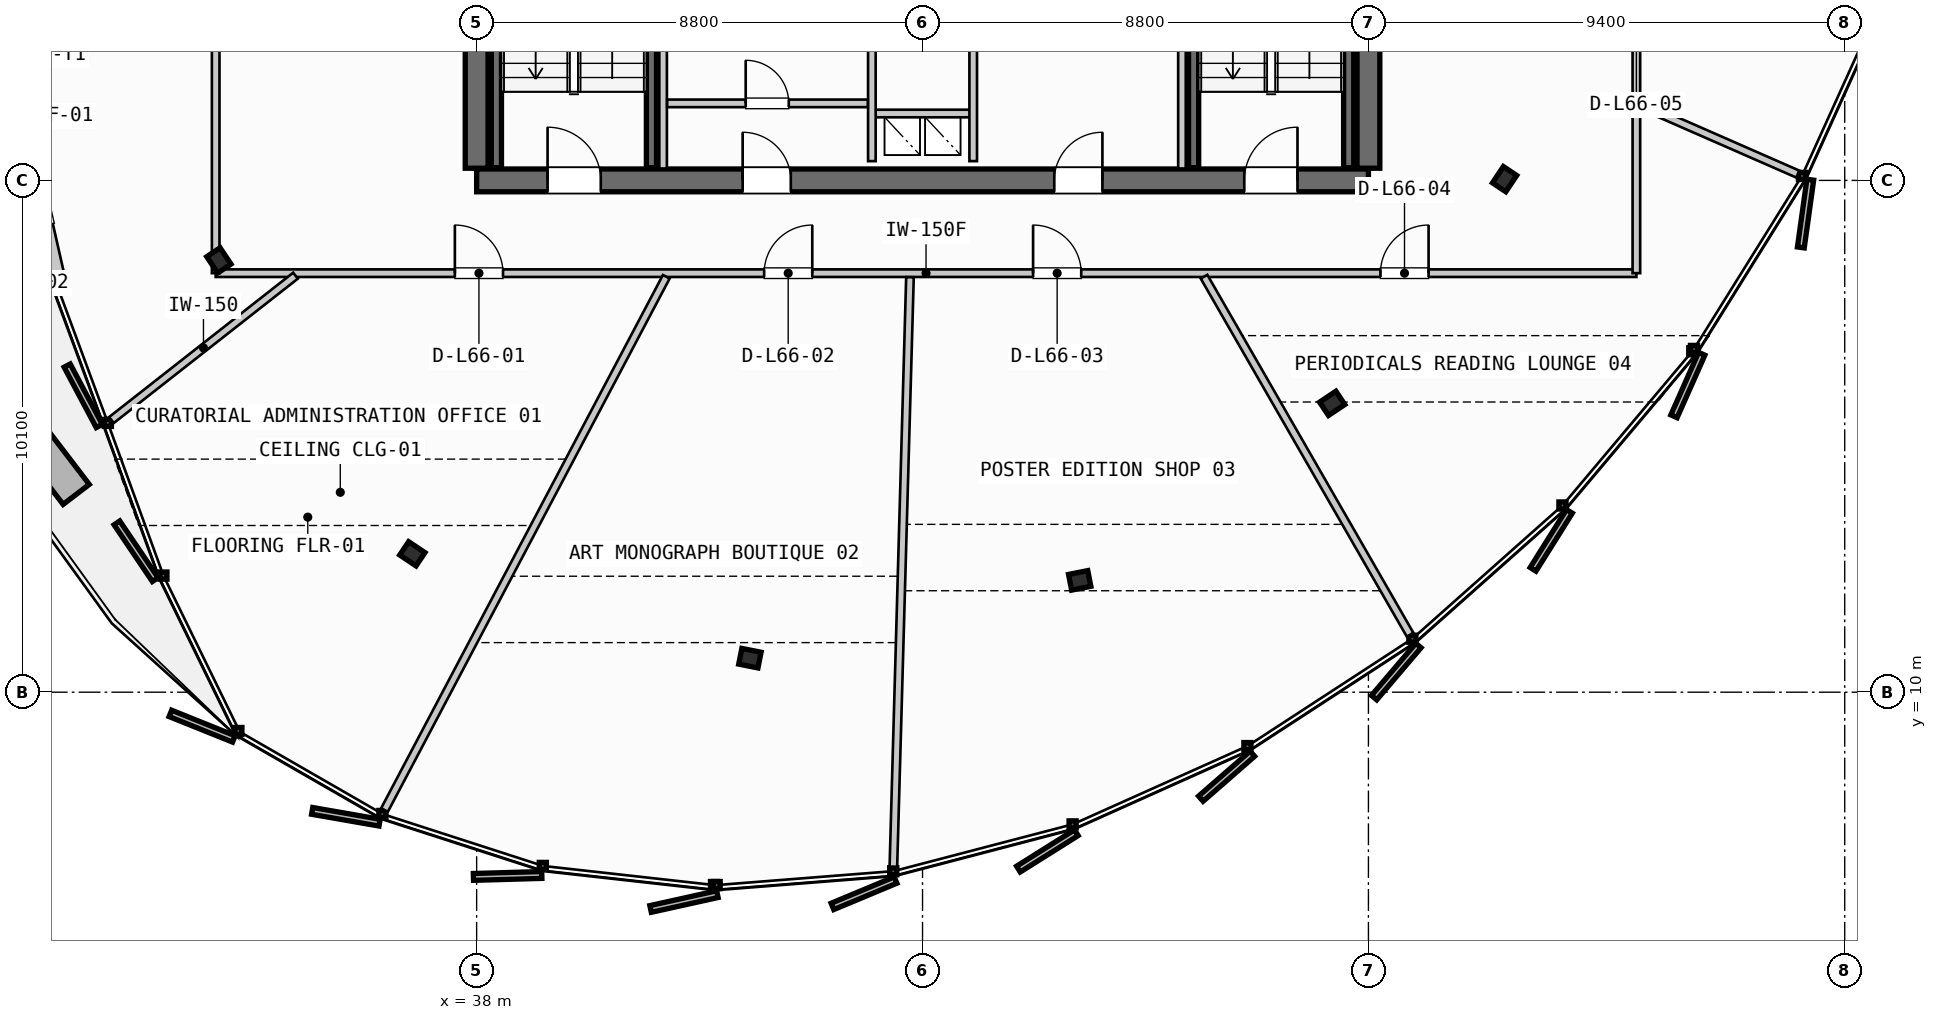
"""IFC4 building model, lengths in metres.
Left out: names, types, materials, properties, quantities, classifications, styles, units other than length and angle.
Written with IfcOpenShell. Run it as: python <this file> out.ifc"""

import sys

from ifc_helpers import new_model, si_unit, direction, frame, frame_2d, origin, origin_2d, place, context, subcontext, project, spatial, rectangle, i_section, extrude, source, transform, mapped, element, fill, save


model = new_model("IFC4")
c1 = context("Model", 3, precision=1e-05, world=origin(), true_north=direction((0.0, 1.0)))
c2 = subcontext(c1, "Body", "Model", "MODEL_VIEW")
j1 = project(units=[si_unit("LENGTHUNIT", "METRE"), si_unit("PLANEANGLEUNIT", "RADIAN")], contexts=[c1])
p1 = place(None, origin())
s1 = spatial("IfcSite", under=j1, at=p1, CompositionType="ELEMENT")
p2 = place(p1, origin())
s2 = spatial("IfcBuilding", under=s1, at=p2, CompositionType="ELEMENT")
p3 = place(p2, frame((0.0, 0.0, 252.55)))
s3 = spatial("IfcBuildingStorey", under=s2, at=p3, CompositionType="ELEMENT", Elevation=252.55)
p4 = place(p3, frame((38.0, 20.1, 0.0), z_axis=(0.0, 0.0, 1.0), x_axis=(1.0, 0.0, 0.0)))
e1 = element("IfcWall", 1, at=p4, inside=s3, PredefinedType="SHEAR", context=c2, shape_type="SweptSolid", body=[
    extrude(rectangle(XDim=17.6, YDim=0.45, at=frame_2d((8.8, 0.0))), origin(), (0.0, 0.0, 1.0), 3.21),
])
p5 = place(p4, frame((1.4, 0.0, 0.0)))
e2 = element("IfcOpeningElement", 2, at=p5, cuts=e1, PredefinedType="OPENING", context=c2, shape_type="SweptSolid", body=[
    extrude(rectangle(XDim=1.05, YDim=2.15, at=frame_2d((0.525, 1.075))), frame((0.0, 0.235, 0.0), z_axis=(0.0, -1.0, 0.0), x_axis=(1.0, 0.0, 0.0)), (0.0, 0.0, 1.0), 0.47),
])
p6 = place(p4, frame((15.15, 0.0, 0.0)))
e3 = element("IfcOpeningElement", 3, at=p6, cuts=e1, PredefinedType="OPENING", context=c2, shape_type="SweptSolid", body=[
    extrude(rectangle(XDim=1.05, YDim=2.15, at=frame_2d((0.525, 1.075))), frame((0.0, 0.235, 0.0), z_axis=(0.0, -1.0, 0.0), x_axis=(1.0, 0.0, 0.0)), (0.0, 0.0, 1.0), 0.47),
])
p7 = place(p4, frame((5.25, 0.0, 0.0)))
e4 = element("IfcOpeningElement", 4, at=p7, cuts=e1, PredefinedType="OPENING", context=c2, shape_type="SweptSolid", body=[
    extrude(rectangle(XDim=0.95, YDim=2.15, at=frame_2d((0.475, 1.075))), frame((0.0, 0.235, 0.0), z_axis=(0.0, -1.0, 0.0), x_axis=(1.0, 0.0, 0.0)), (0.0, 0.0, 1.0), 0.47),
])
p8 = place(p4, frame((11.4, 0.0, 0.0)))
e5 = element("IfcOpeningElement", 5, at=p8, cuts=e1, PredefinedType="OPENING", context=c2, shape_type="SweptSolid", body=[
    extrude(rectangle(XDim=0.95, YDim=2.15, at=frame_2d((0.475, 1.075))), frame((0.0, 0.235, 0.0), z_axis=(0.0, -1.0, 0.0), x_axis=(1.0, 0.0, 0.0)), (0.0, 0.0, 1.0), 0.47),
])
p9 = place(p3, frame((38.0, 35.26, 0.0), z_axis=(0.0, 0.0, 1.0), x_axis=(0.0, -1.0, 0.0)))
e6 = element("IfcWall", 6, at=p9, inside=s3, PredefinedType="SHEAR", context=c2, shape_type="SweptSolid", body=[
    extrude(rectangle(XDim=14.92, YDim=0.45, at=frame_2d((7.46, 0.0))), origin(), (0.0, 0.0, 1.0), 3.21),
])
p10 = place(p9, frame((5.21, 0.0, 0.0)))
e7 = element("IfcOpeningElement", 7, at=p10, cuts=e6, PredefinedType="OPENING", context=c2, shape_type="SweptSolid", body=[
    extrude(rectangle(XDim=1.1, YDim=2.2, at=frame_2d((0.55, 1.1))), frame((0.0, 0.235, 0.0), z_axis=(0.0, -1.0, 0.0), x_axis=(1.0, 0.0, 0.0)), (0.0, 0.0, 1.0), 0.47),
])
p11 = place(p3, frame((55.6, 20.34, 0.0), z_axis=(0.0, 0.0, 1.0), x_axis=(0.0, 1.0, 0.0)))
e8 = element("IfcWall", 8, at=p11, inside=s3, PredefinedType="SHEAR", context=c2, shape_type="SweptSolid", body=[
    extrude(rectangle(XDim=14.92, YDim=0.45, at=frame_2d((7.46, 0.0))), origin(), (0.0, 0.0, 1.0), 3.21),
])
p12 = place(p11, frame((12.71, 0.0, 0.0)))
e9 = element("IfcOpeningElement", 9, at=p12, cuts=e8, PredefinedType="OPENING", context=c2, shape_type="SweptSolid", body=[
    extrude(rectangle(XDim=1.05, YDim=2.15, at=frame_2d((0.525, 1.075))), frame((0.0, 0.235, 0.0), z_axis=(0.0, -1.0, 0.0), x_axis=(1.0, 0.0, 0.0)), (0.0, 0.0, 1.0), 0.47),
])
p13 = place(p11, frame((8.61, 0.0, 0.0)))
e10 = element("IfcOpeningElement", 10, at=p13, cuts=e8, PredefinedType="OPENING", context=c2, shape_type="SweptSolid", body=[
    extrude(rectangle(XDim=1.1, YDim=2.2, at=frame_2d((0.55, 1.1))), frame((0.0, 0.235, 0.0), z_axis=(0.0, -1.0, 0.0), x_axis=(1.0, 0.0, 0.0)), (0.0, 0.0, 1.0), 0.47),
])
m1 = source(origin(), c2, "Body", "SweptSolid", [
    extrude(i_section(OverallWidth=0.387, OverallDepth=0.316, WebThickness=0.019, FlangeThickness=0.028, FilletRadius=0.015, at=origin_2d()), origin(), (0.0, 0.0, 1.0), 3.21),
])
for number, where, z_axis, x_axis in (
    (11, (32.913, 18.521, 0.0), (0.0, 0.0, 1.0), (-0.831, -0.556, 0.0)),
    (12, (36.731, 12.731, 0.0), (0.0, 0.0, 1.0), (-0.556, -0.831, 0.0)),
    (13, (43.393, 10.671, 0.0), (0.0, 0.0, 1.0), (-0.195, -0.981, 0.0)),
    (14, (49.902, 12.207, 0.0), (0.0, 0.0, 1.0), (0.195, -0.981, 0.0)),
    (15, (54.885, 15.7, 0.0), (0.0, 0.0, 1.0), (0.556, -0.831, 0.0)),
    (16, (58.287, 20.125, 0.0), (0.0, 0.0, 1.0), (0.831, -0.556, 0.0)),
):
    element("IfcColumn", number, at=place(p3, frame(where, z_axis=z_axis, x_axis=x_axis)), inside=s3, PredefinedType="COLUMN", context=c2, shape_type="MappedRepresentation", body=[
        mapped(m1, transform((0.0, 0.0, 0.0), scale=1.0)),
    ])
p14 = place(p3, frame((29.721, 18.192, 0.0), z_axis=(0.0, 0.0, 1.0), x_axis=(-0.221248249318, 0.97521752044, 0.0)))
e17 = element("IfcWall", 17, at=p14, inside=s3, PredefinedType="SOLIDWALL", context=c2, shape_type="SweptSolid", body=[
    extrude(rectangle(XDim=3.142, YDim=0.3, at=frame_2d((1.571, 0.0))), origin(), (0.0, 0.0, 1.0), 2.735),
])
p15 = place(p14, frame((1.046, 0.0, 0.0)))
e18 = element("IfcOpeningElement", 18, at=p15, cuts=e17, PredefinedType="OPENING", context=c2, shape_type="SweptSolid", body=[
    extrude(rectangle(XDim=1.05, YDim=2.2, at=frame_2d((0.525, 1.1))), frame((0.0, 0.16, 0.0), z_axis=(0.0, -1.0, 0.0), x_axis=(1.0, 0.0, 0.0)), (0.0, 0.0, 1.0), 0.32),
])
for number, where, z_axis, x_axis in (
    (19, (41.45, 27.7, 0.0), (0.0, 0.0, 1.0), (0.0, -1.0, 0.0)),
    (20, (38.39, 20.35, 0.0), (0.0, 0.0, 1.0), (0.0, 1.0, 0.0)),
    (21, (55.21, 27.7, 0.0), (0.0, 0.0, 1.0), (0.0, -1.0, 0.0)),
    (22, (52.15, 20.35, 0.0), (0.0, 0.0, 1.0), (0.0, 1.0, 0.0)),
):
    element("IfcWall", number, at=place(p3, frame(where, z_axis=z_axis, x_axis=x_axis)), inside=s3, PredefinedType="SHEAR", context=c2, shape_type="SweptSolid", body=[
        extrude(rectangle(XDim=7.35, YDim=0.2, at=frame_2d((3.675, 0.0))), origin(), (0.0, 0.0, 1.0), 3.21),
    ])
p16 = place(p3, frame((45.8, 21.42, 0.0), z_axis=(0.0, 0.0, 1.0), x_axis=(1.0, 0.0, 0.0)))
e23 = element("IfcWall", 23, at=p16, inside=s3, PredefinedType="PARTITIONING", context=c2, shape_type="SweptSolid", body=[
    extrude(rectangle(XDim=2.0, YDim=0.15, at=frame_2d((1.0, 0.0))), origin(), (0.0, 0.0, 1.0), 2.28),
])
for number, where, z_axis, x_axis in (
    (24, (45.8, 20.48, 0.0), (0.0, 0.0, 1.0), (0.0, 1.0, 0.0)),
    (25, (47.8, 20.48, 0.0), (0.0, 0.0, 1.0), (0.0, 1.0, 0.0)),
):
    element("IfcWall", number, at=place(p3, frame(where, z_axis=z_axis, x_axis=x_axis)), inside=s3, PredefinedType="PARTITIONING", context=c2, shape_type="SweptSolid", body=[
        extrude(rectangle(XDim=2.24, YDim=0.15, at=frame_2d((1.12, 0.0))), origin(), (0.0, 0.0, 1.0), 2.28),
    ])
for number, where, z_axis, x_axis in (
    (26, (41.68, 20.335, 0.0), (0.0, 0.0, 1.0), (0.0, 1.0, 0.0)),
    (27, (51.92, 20.335, 0.0), (0.0, 0.0, 1.0), (0.0, 1.0, 0.0)),
):
    element("IfcWall", number, at=place(p3, frame(where, z_axis=z_axis, x_axis=x_axis)), inside=s3, PredefinedType="PARTITIONING", context=c2, shape_type="SweptSolid", body=[
        extrude(rectangle(XDim=2.395, YDim=0.15, at=frame_2d((1.198, 0.0))), origin(), (0.0, 0.0, 1.0), 2.28),
    ])
p17 = place(p3, frame((41.76, 21.62, 0.0), z_axis=(0.0, 0.0, 1.0), x_axis=(1.0, 0.0, 0.0)))
e28 = element("IfcWall", 28, at=p17, inside=s3, PredefinedType="PARTITIONING", context=c2, shape_type="SweptSolid", body=[
    extrude(rectangle(XDim=3.96, YDim=0.15, at=frame_2d((1.98, 0.0))), origin(), (0.0, 0.0, 1.0), 2.28),
])
p18 = place(p17, frame((1.55, 0.0, 0.0)))
e29 = element("IfcOpeningElement", 29, at=p18, cuts=e28, PredefinedType="OPENING", context=c2, shape_type="SweptSolid", body=[
    extrude(rectangle(XDim=0.85, YDim=2.15, at=frame_2d((0.425, 1.075))), frame((0.0, 0.085, 0.0), z_axis=(0.0, -1.0, 0.0), x_axis=(1.0, 0.0, 0.0)), (0.0, 0.0, 1.0), 0.17),
])
p19 = place(p3, frame((32.85, 18.269, 0.0), z_axis=(0.0, 0.0, 1.0), x_axis=(1.0, 0.0, 0.0)))
e30 = element("IfcWall", 30, at=p19, inside=s3, PredefinedType="PARTITIONING", context=c2, shape_type="SweptSolid", body=[
    extrude(rectangle(XDim=28.038, YDim=0.15, at=frame_2d((14.019, 0.0))), origin(), (0.0, 0.0, 1.0), 2.28),
])
p20 = place(p19, frame((4.72, 0.0, 0.0)))
e31 = element("IfcOpeningElement", 31, at=p20, cuts=e30, PredefinedType="OPENING", context=c2, shape_type="SweptSolid", body=[
    extrude(rectangle(XDim=0.95, YDim=2.15, at=frame_2d((0.475, 1.075))), frame((0.0, 0.085, 0.0), z_axis=(0.0, -1.0, 0.0), x_axis=(1.0, 0.0, 0.0)), (0.0, 0.0, 1.0), 0.17),
])
p21 = place(p19, frame((10.824, 0.0, 0.0)))
e32 = element("IfcOpeningElement", 32, at=p21, cuts=e30, PredefinedType="OPENING", context=c2, shape_type="SweptSolid", body=[
    extrude(rectangle(XDim=0.95, YDim=2.15, at=frame_2d((0.475, 1.075))), frame((0.0, 0.085, 0.0), z_axis=(0.0, -1.0, 0.0), x_axis=(1.0, 0.0, 0.0)), (0.0, 0.0, 1.0), 0.17),
])
p22 = place(p19, frame((16.132, 0.0, 0.0)))
e33 = element("IfcOpeningElement", 33, at=p22, cuts=e30, PredefinedType="OPENING", context=c2, shape_type="SweptSolid", body=[
    extrude(rectangle(XDim=0.95, YDim=2.15, at=frame_2d((0.475, 1.075))), frame((0.0, 0.085, 0.0), z_axis=(0.0, -1.0, 0.0), x_axis=(1.0, 0.0, 0.0)), (0.0, 0.0, 1.0), 0.17),
])
p23 = place(p19, frame((22.987, 0.0, 0.0)))
e34 = element("IfcOpeningElement", 34, at=p23, cuts=e30, PredefinedType="OPENING", context=c2, shape_type="SweptSolid", body=[
    extrude(rectangle(XDim=0.95, YDim=2.15, at=frame_2d((0.475, 1.075))), frame((0.0, 0.085, 0.0), z_axis=(0.0, -1.0, 0.0), x_axis=(1.0, 0.0, 0.0)), (0.0, 0.0, 1.0), 0.17),
])
p24 = place(p3, frame((60.888, 18.269, 0.0), z_axis=(0.0, 0.0, 1.0), x_axis=(0.0, 1.0, 0.0)))
e35 = element("IfcWall", 35, at=p24, inside=s3, PredefinedType="PARTITIONING", context=c2, shape_type="SweptSolid", body=[
    extrude(rectangle(XDim=19.293, YDim=0.15, at=frame_2d((9.646, 0.0))), origin(), (0.0, 0.0, 1.0), 2.28),
])
p25 = place(p24, frame((4.488, 0.0, 0.0)))
e36 = element("IfcOpeningElement", 36, at=p25, cuts=e35, PredefinedType="OPENING", context=c2, shape_type="SweptSolid", body=[
    extrude(rectangle(XDim=0.95, YDim=2.15, at=frame_2d((0.475, 1.075))), frame((0.0, 0.085, 0.0), z_axis=(0.0, -1.0, 0.0), x_axis=(1.0, 0.0, 0.0)), (0.0, 0.0, 1.0), 0.17),
])
p26 = place(p24, frame((13.776, 0.0, 0.0)))
e37 = element("IfcOpeningElement", 37, at=p26, cuts=e35, PredefinedType="OPENING", context=c2, shape_type="SweptSolid", body=[
    extrude(rectangle(XDim=0.95, YDim=2.15, at=frame_2d((0.475, 1.075))), frame((0.0, 0.085, 0.0), z_axis=(0.0, -1.0, 0.0), x_axis=(1.0, 0.0, 0.0)), (0.0, 0.0, 1.0), 0.17),
])
p27 = place(p24, frame((16.62, 0.0, 0.0)))
e38 = element("IfcOpeningElement", 38, at=p27, cuts=e35, PredefinedType="OPENING", context=c2, shape_type="SweptSolid", body=[
    extrude(rectangle(XDim=0.95, YDim=2.15, at=frame_2d((0.475, 1.075))), frame((0.0, 0.085, 0.0), z_axis=(0.0, -1.0, 0.0), x_axis=(1.0, 0.0, 0.0)), (0.0, 0.0, 1.0), 0.17),
])
p28 = place(p3, frame((32.85, 37.562, 0.0), z_axis=(0.0, 0.0, 1.0), x_axis=(0.0, -1.0, 0.0)))
e39 = element("IfcWall", 39, at=p28, inside=s3, PredefinedType="PARTITIONING", context=c2, shape_type="SweptSolid", body=[
    extrude(rectangle(XDim=19.293, YDim=0.15, at=frame_2d((9.646, 0.0))), origin(), (0.0, 0.0, 1.0), 2.28),
])
p29 = place(p28, frame((10.664, 0.0, 0.0)))
e40 = element("IfcOpeningElement", 40, at=p29, cuts=e39, PredefinedType="OPENING", context=c2, shape_type="SweptSolid", body=[
    extrude(rectangle(XDim=0.95, YDim=2.15, at=frame_2d((0.475, 1.075))), frame((0.0, 0.085, 0.0), z_axis=(0.0, -1.0, 0.0), x_axis=(1.0, 0.0, 0.0)), (0.0, 0.0, 1.0), 0.17),
])
p30 = place(p3, frame((34.425, 18.219, 0.0), z_axis=(0.0, 0.0, 1.0), x_axis=(-0.786874062285, -0.61711361199, 0.0)))
e41 = element("IfcWall", 41, at=p30, inside=s3, PredefinedType="PARTITIONING", context=c2, shape_type="SweptSolid", body=[
    extrude(rectangle(XDim=4.616, YDim=0.15, at=frame_2d((2.308, 0.0))), origin(), (0.0, 0.0, 1.0), 2.28),
])
p31 = place(p3, frame((41.743, 18.198, 0.0), z_axis=(0.0, 0.0, 1.0), x_axis=(-0.467260826369, -0.884119516887, 0.0)))
e42 = element("IfcWall", 42, at=p31, inside=s3, PredefinedType="PARTITIONING", context=c2, shape_type="SweptSolid", body=[
    extrude(rectangle(XDim=11.901, YDim=0.15, at=frame_2d((5.951, 0.0))), origin(), (0.0, 0.0, 1.0), 2.28),
])
p32 = place(p3, frame((46.552, 18.189, 0.0), z_axis=(0.0, 0.0, 1.0), x_axis=(-0.028133929021, -0.999604162675, 0.0)))
e43 = element("IfcWall", 43, at=p32, inside=s3, PredefinedType="PARTITIONING", context=c2, shape_type="SweptSolid", body=[
    extrude(rectangle(XDim=11.637, YDim=0.15, at=frame_2d((5.818, 0.0))), origin(), (0.0, 0.0, 1.0), 2.28),
])
p33 = place(p3, frame((52.356, 18.2, 0.0), z_axis=(0.0, 0.0, 1.0), x_axis=(0.498826091976, -0.866702099896, 0.0)))
e44 = element("IfcWall", 44, at=p33, inside=s3, PredefinedType="PARTITIONING", context=c2, shape_type="SweptSolid", body=[
    extrude(rectangle(XDim=8.153, YDim=0.15, at=frame_2d((4.076, 0.0))), origin(), (0.0, 0.0, 1.0), 2.28),
])
p34 = place(p3, frame((60.961, 21.588, 0.0), z_axis=(0.0, 0.0, 1.0), x_axis=(0.915923060323, -0.401353893178, 0.0)))
e45 = element("IfcWall", 45, at=p34, inside=s3, PredefinedType="PARTITIONING", context=c2, shape_type="SweptSolid", body=[
    extrude(rectangle(XDim=3.398, YDim=0.15, at=frame_2d((1.699, 0.0))), origin(), (0.0, 0.0, 1.0), 2.28),
])
m2 = source(origin(), c2, "Body", "SweptSolid", [
    extrude(rectangle(XDim=1.05, YDim=2.15, at=frame_2d((0.525, 1.075))), frame((0.0, 0.025, 0.0), z_axis=(0.0, -1.0, 0.0), x_axis=(1.0, 0.0, 0.0)), (0.0, 0.0, 1.0), 0.05),
])
p35 = place(p5, origin())
e46 = element("IfcDoor", 46, at=p35, inside=s3, OperationType="SINGLE_SWING_LEFT", PredefinedType="DOOR", context=c2, shape_type="MappedRepresentation", body=[
    mapped(m2, transform((0.0, 0.0, 0.0), scale=1.0)),
])
fill(e2, e46)
p36 = place(p6, origin())
e47 = element("IfcDoor", 47, at=p36, inside=s3, OperationType="SINGLE_SWING_RIGHT", PredefinedType="DOOR", context=c2, shape_type="MappedRepresentation", body=[
    mapped(m2, transform((0.0, 0.0, 0.0), scale=1.0)),
])
fill(e3, e47)
m3 = source(origin(), c2, "Body", "SweptSolid", [
    extrude(rectangle(XDim=0.95, YDim=2.15, at=frame_2d((0.475, 1.075))), frame((0.0, 0.025, 0.0), z_axis=(0.0, -1.0, 0.0), x_axis=(1.0, 0.0, 0.0)), (0.0, 0.0, 1.0), 0.05),
])
p37 = place(p7, origin())
e48 = element("IfcDoor", 48, at=p37, inside=s3, OperationType="SINGLE_SWING_LEFT", PredefinedType="DOOR", context=c2, shape_type="MappedRepresentation", body=[
    mapped(m3, transform((0.0, 0.0, 0.0), scale=1.0)),
])
fill(e4, e48)
p38 = place(p8, origin())
e49 = element("IfcDoor", 49, at=p38, inside=s3, OperationType="SINGLE_SWING_RIGHT", PredefinedType="DOOR", context=c2, shape_type="MappedRepresentation", body=[
    mapped(m3, transform((0.0, 0.0, 0.0), scale=1.0)),
])
fill(e5, e49)
m4 = source(origin(), c2, "Body", "SweptSolid", [
    extrude(rectangle(XDim=0.85, YDim=2.15, at=frame_2d((0.425, 1.075))), frame((0.0, 0.025, 0.0), z_axis=(0.0, -1.0, 0.0), x_axis=(1.0, 0.0, 0.0)), (0.0, 0.0, 1.0), 0.05),
])
p39 = place(p18, origin())
e50 = element("IfcDoor", 50, at=p39, inside=s3, OperationType="SINGLE_SWING_LEFT", PredefinedType="DOOR", context=c2, shape_type="MappedRepresentation", body=[
    mapped(m4, transform((0.0, 0.0, 0.0), scale=1.0)),
])
fill(e29, e50)
p40 = place(p20, origin())
e51 = element("IfcDoor", 51, at=p40, inside=s3, OperationType="SINGLE_SWING_LEFT", PredefinedType="DOOR", context=c2, shape_type="MappedRepresentation", body=[
    mapped(m3, transform((0.0, 0.0, 0.0), scale=1.0)),
])
fill(e31, e51)
p41 = place(p21, origin())
e52 = element("IfcDoor", 52, at=p41, inside=s3, OperationType="SINGLE_SWING_RIGHT", PredefinedType="DOOR", context=c2, shape_type="MappedRepresentation", body=[
    mapped(m3, transform((0.0, 0.0, 0.0), scale=1.0)),
])
fill(e32, e52)
p42 = place(p22, origin())
e53 = element("IfcDoor", 53, at=p42, inside=s3, OperationType="SINGLE_SWING_LEFT", PredefinedType="DOOR", context=c2, shape_type="MappedRepresentation", body=[
    mapped(m3, transform((0.0, 0.0, 0.0), scale=1.0)),
])
fill(e33, e53)
p43 = place(p23, origin())
e54 = element("IfcDoor", 54, at=p43, inside=s3, OperationType="SINGLE_SWING_RIGHT", PredefinedType="DOOR", context=c2, shape_type="MappedRepresentation", body=[
    mapped(m3, transform((0.0, 0.0, 0.0), scale=1.0)),
])
fill(e34, e54)
save(model, sys.argv[1])
